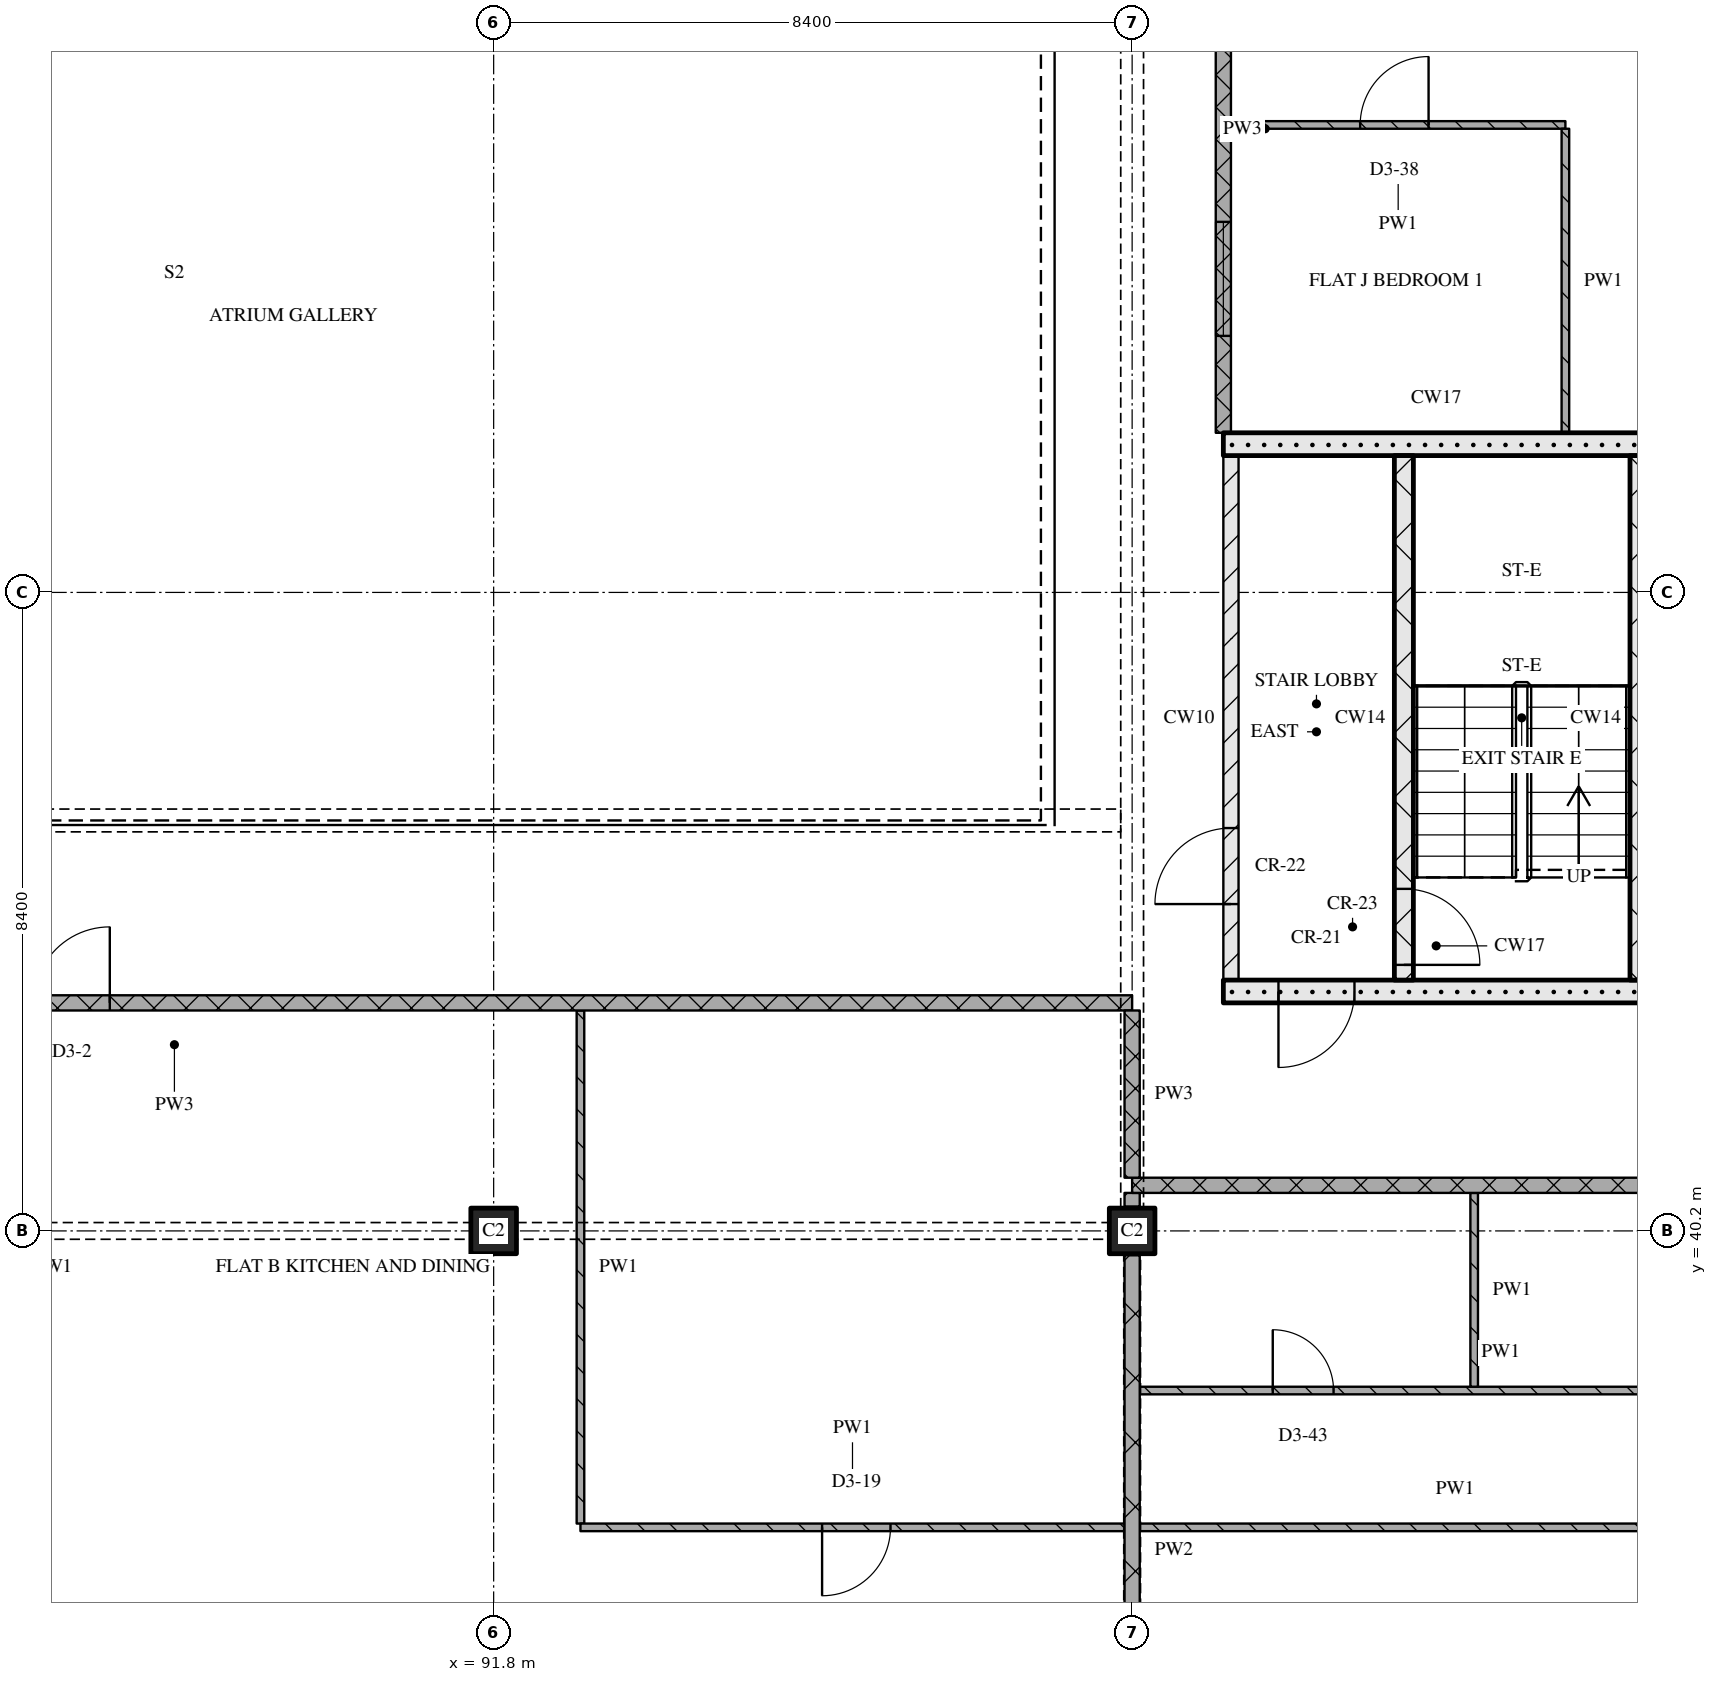
"""IFC4 building model, lengths in metres.
Left out: names, types, materials, properties, quantities, classifications, styles, units other than length and angle.
Written with IfcOpenShell. Run it as: python <this file> out.ifc"""

import sys

from ifc_helpers import new_model, si_unit, direction, frame, frame_2d, origin, origin_2d, place, context, subcontext, project, spatial, rectangle, extrude, element, fill, save


model = new_model("IFC4")
c1 = context("Model", 3, precision=1e-05, world=origin(), true_north=direction((0.0, 1.0)))
c2 = subcontext(c1, "Body", "Model", "MODEL_VIEW")
j1 = project(units=[si_unit("LENGTHUNIT", "METRE"), si_unit("PLANEANGLEUNIT", "RADIAN")], contexts=[c1])
p1 = place(None, origin())
s1 = spatial("IfcSite", under=j1, at=p1, CompositionType="ELEMENT")
p2 = place(p1, origin())
s2 = spatial("IfcBuilding", under=s1, at=p2, CompositionType="ELEMENT")
p3 = place(p2, frame((0.0, 0.0, 234.3)))
s3 = spatial("IfcBuildingStorey", under=s2, at=p3, CompositionType="ELEMENT", Elevation=234.3)
for number, where, z_axis, x_axis in (
    (1, (91.8, 40.2, 0.0), (0.0, 0.0, 1.0), (1.0, 0.0, 0.0)),
    (2, (100.2, 40.2, 0.0), (0.0, 0.0, 1.0), (1.0, 0.0, 0.0)),
):
    element("IfcColumn", number, at=place(p3, frame(where, z_axis=z_axis, x_axis=x_axis)), inside=s3, PredefinedType="COLUMN", context=c2, shape_type="SweptSolid", body=[
        extrude(rectangle(XDim=0.6, YDim=0.6, at=origin_2d()), origin(), (0.0, 0.0, 1.0), 3.6),
    ])
p4 = place(p3, frame((101.4, 43.35, 0.0), z_axis=(0.0, 0.0, 1.0), x_axis=(1.0, 0.0, 0.0)))
e3 = element("IfcWall", 3, at=p4, inside=s3, PredefinedType="SOLIDWALL", context=c2, shape_type="SweptSolid", body=[
    extrude(rectangle(XDim=5.6, YDim=0.3, at=frame_2d((2.8, 0.0))), origin(), (0.0, 0.0, 1.0), 3.32),
])
p5 = place(p4, frame((0.725, 0.0, 0.0)))
e4 = element("IfcOpeningElement", 4, at=p5, cuts=e3, PredefinedType="OPENING", context=c2, shape_type="SweptSolid", body=[
    extrude(rectangle(XDim=1.0, YDim=2.1, at=frame_2d((0.5, 1.05))), frame((0.0, 0.16, 0.0), z_axis=(0.0, -1.0, 0.0), x_axis=(1.0, 0.0, 0.0)), (0.0, 0.0, 1.0), 0.32),
])
p6 = place(p3, frame((101.5, 43.5, 0.0), z_axis=(0.0, 0.0, 1.0), x_axis=(0.0, 1.0, 0.0)))
e5 = element("IfcWall", 5, at=p6, inside=s3, PredefinedType="PARTITIONING", context=c2, shape_type="SweptSolid", body=[
    extrude(rectangle(XDim=6.9, YDim=0.2, at=frame_2d((3.45, 0.0))), origin(), (0.0, 0.0, 1.0), 3.32),
])
p7 = place(p6, frame((1.0, 0.0, 0.0)))
e6 = element("IfcOpeningElement", 6, at=p7, cuts=e5, PredefinedType="OPENING", context=c2, shape_type="SweptSolid", body=[
    extrude(rectangle(XDim=1.0, YDim=2.1, at=frame_2d((0.5, 1.05))), frame((0.0, 0.11, 0.0), z_axis=(0.0, -1.0, 0.0), x_axis=(1.0, 0.0, 0.0)), (0.0, 0.0, 1.0), 0.22),
])
p8 = place(p3, frame((103.775, 43.5, 0.0), z_axis=(0.0, 0.0, 1.0), x_axis=(0.0, 1.0, 0.0)))
e7 = element("IfcWall", 7, at=p8, inside=s3, PredefinedType="SOLIDWALL", context=c2, shape_type="SweptSolid", body=[
    extrude(rectangle(XDim=6.9, YDim=0.25, at=frame_2d((3.45, 0.0))), origin(), (0.0, 0.0, 1.0), 3.32),
])
p9 = place(p8, frame((0.2, 0.0, 0.0)))
e8 = element("IfcOpeningElement", 8, at=p9, cuts=e7, PredefinedType="OPENING", context=c2, shape_type="SweptSolid", body=[
    extrude(rectangle(XDim=1.0, YDim=2.1, at=frame_2d((0.5, 1.05))), frame((0.0, 0.135, 0.0), z_axis=(0.0, -1.0, 0.0), x_axis=(1.0, 0.0, 0.0)), (0.0, 0.0, 1.0), 0.27),
])
p10 = place(p3, frame((106.875, 43.5, 0.0), z_axis=(0.0, 0.0, 1.0), x_axis=(0.0, 1.0, 0.0)))
e9 = element("IfcWall", 9, at=p10, inside=s3, PredefinedType="SOLIDWALL", context=c2, shape_type="SweptSolid", body=[
    extrude(rectangle(XDim=6.9, YDim=0.25, at=frame_2d((3.45, 0.0))), origin(), (0.0, 0.0, 1.0), 3.32),
])
p11 = place(p3, frame((101.4, 50.55, 0.0), z_axis=(0.0, 0.0, 1.0), x_axis=(1.0, 0.0, 0.0)))
e10 = element("IfcWall", 10, at=p11, inside=s3, PredefinedType="SOLIDWALL", context=c2, shape_type="SweptSolid", body=[
    extrude(rectangle(XDim=5.6, YDim=0.3, at=frame_2d((2.8, 0.0))), origin(), (0.0, 0.0, 1.0), 3.32),
])
p12 = place(p3, frame((100.3, 38.1, 0.0), z_axis=(0.0, 0.0, 1.0), x_axis=(1.0, 0.0, 0.0)))
e11 = element("IfcWall", 11, at=p12, inside=s3, PredefinedType="PARTITIONING", context=c2, shape_type="SweptSolid", body=[
    extrude(rectangle(XDim=9.5, YDim=0.1, at=frame_2d((4.75, 0.0))), origin(), (0.0, 0.0, 1.0), 3.32),
])
p13 = place(p12, frame((1.75, 0.0, 0.0)))
e12 = element("IfcOpeningElement", 12, at=p13, cuts=e11, PredefinedType="OPENING", context=c2, shape_type="SweptSolid", body=[
    extrude(rectangle(XDim=0.8, YDim=2.1, at=frame_2d((0.4, 1.05))), frame((0.0, 0.06, 0.0), z_axis=(0.0, -1.0, 0.0), x_axis=(1.0, 0.0, 0.0)), (0.0, 0.0, 1.0), 0.12),
])
p14 = place(p3, frame((124.58, 40.8, 0.0), z_axis=(0.0, 0.0, 1.0), x_axis=(-1.0, 0.0, 0.0)))
e13 = element("IfcWall", 13, at=p14, inside=s3, PredefinedType="PARTITIONING", context=c2, shape_type="SweptSolid", body=[
    extrude(rectangle(XDim=24.38, YDim=0.2, at=frame_2d((12.19, 0.0))), origin(), (0.0, 0.0, 1.0), 3.32),
])
p15 = place(p14, frame((13.53, 0.0, 0.0)))
e14 = element("IfcOpeningElement", 14, at=p15, cuts=e13, PredefinedType="OPENING", context=c2, shape_type="SweptSolid", body=[
    extrude(rectangle(XDim=1.0, YDim=2.1, at=frame_2d((0.5, 1.05))), frame((0.0, 0.11, 0.0), z_axis=(0.0, -1.0, 0.0), x_axis=(1.0, 0.0, 0.0)), (0.0, 0.0, 1.0), 0.22),
])
p16 = place(p3, frame((100.2, 43.2, 0.0), z_axis=(0.0, 0.0, 1.0), x_axis=(-1.0, 0.0, 0.0)))
e15 = element("IfcWall", 15, at=p16, inside=s3, PredefinedType="PARTITIONING", context=c2, shape_type="SweptSolid", body=[
    extrude(rectangle(XDim=25.2, YDim=0.2, at=frame_2d((12.6, 0.0))), origin(), (0.0, 0.0, 1.0), 3.32),
])
p17 = place(p16, frame((13.45, 0.0, 0.0)))
e16 = element("IfcOpeningElement", 16, at=p17, cuts=e15, PredefinedType="OPENING", context=c2, shape_type="SweptSolid", body=[
    extrude(rectangle(XDim=1.0, YDim=2.1, at=frame_2d((0.5, 1.05))), frame((0.0, 0.11, 0.0), z_axis=(0.0, -1.0, 0.0), x_axis=(1.0, 0.0, 0.0)), (0.0, 0.0, 1.0), 0.22),
])
p18 = place(p3, frame((105.9, 54.75, 0.0), z_axis=(0.0, 0.0, 1.0), x_axis=(-1.0, 0.0, 0.0)))
e17 = element("IfcWall", 17, at=p18, inside=s3, PredefinedType="PARTITIONING", context=c2, shape_type="SweptSolid", body=[
    extrude(rectangle(XDim=4.4, YDim=0.1, at=frame_2d((2.2, 0.0))), origin(), (0.0, 0.0, 1.0), 3.32),
])
p19 = place(p18, frame((1.8, 0.0, 0.0)))
e18 = element("IfcOpeningElement", 18, at=p19, cuts=e17, PredefinedType="OPENING", context=c2, shape_type="SweptSolid", body=[
    extrude(rectangle(XDim=0.9, YDim=2.1, at=frame_2d((0.45, 1.05))), frame((0.0, 0.06, 0.0), z_axis=(0.0, -1.0, 0.0), x_axis=(1.0, 0.0, 0.0)), (0.0, 0.0, 1.0), 0.12),
])
p20 = place(p3, frame((92.942, 43.1, 0.0), z_axis=(0.0, 0.0, 1.0), x_axis=(0.0, -1.0, 0.0)))
e19 = element("IfcWall", 19, at=p20, inside=s3, PredefinedType="PARTITIONING", context=c2, shape_type="SweptSolid", body=[
    extrude(rectangle(XDim=6.75, YDim=0.1, at=frame_2d((3.375, 0.0))), origin(), (0.0, 0.0, 1.0), 3.32),
])
p21 = place(p3, frame((100.2, 43.1, 0.0), z_axis=(0.0, 0.0, 1.0), x_axis=(0.0, -1.0, 0.0)))
e20 = element("IfcWall", 20, at=p21, inside=s3, PredefinedType="PARTITIONING", context=c2, shape_type="SweptSolid", body=[
    extrude(rectangle(XDim=2.2, YDim=0.2, at=frame_2d((1.1, 0.0))), origin(), (0.0, 0.0, 1.0), 2.53),
])
p22 = place(p3, frame((100.2, 39.88, 0.0), z_axis=(0.0, 0.0, 1.0), x_axis=(0.0, -1.0, 0.0)))
e21 = element("IfcWall", 21, at=p22, inside=s3, PredefinedType="PARTITIONING", context=c2, shape_type="SweptSolid", body=[
    extrude(rectangle(XDim=7.76, YDim=0.2, at=frame_2d((3.88, 0.0))), origin(), (0.0, 0.0, 1.0), 2.72),
])
p23 = place(p3, frame((100.2, 40.7, 0.0), z_axis=(0.0, 0.0, 1.0), x_axis=(0.0, -1.0, 0.0)))
e22 = element("IfcWall", 22, at=p23, inside=s3, PredefinedType="PARTITIONING", context=c2, shape_type="SweptSolid", body=[
    extrude(rectangle(XDim=0.18, YDim=0.2, at=frame_2d((0.09, 0.0))), origin(), (0.0, 0.0, 1.0), 3.32),
])
p24 = place(p3, frame((101.4, 58.7, 0.0), z_axis=(0.0, 0.0, 1.0), x_axis=(0.0, -1.0, 0.0)))
e23 = element("IfcWall", 23, at=p24, inside=s3, PredefinedType="PARTITIONING", context=c2, shape_type="SweptSolid", body=[
    extrude(rectangle(XDim=8.0, YDim=0.2, at=frame_2d((4.0, 0.0))), origin(), (0.0, 0.0, 1.0), 3.32),
])
p25 = place(p24, frame((5.225, 0.0, 0.9)))
e24 = element("IfcOpeningElement", 24, at=p25, cuts=e23, PredefinedType="OPENING", context=c2, shape_type="SweptSolid", body=[
    extrude(rectangle(XDim=1.5, YDim=1.5, at=frame_2d((0.75, 0.75))), frame((0.0, 0.11, 0.0), z_axis=(0.0, -1.0, 0.0), x_axis=(1.0, 0.0, 0.0)), (0.0, 0.0, 1.0), 0.22),
])
p26 = place(p3, frame((104.7, 40.7, 0.0), z_axis=(0.0, 0.0, 1.0), x_axis=(0.0, -1.0, 0.0)))
e25 = element("IfcWall", 25, at=p26, inside=s3, PredefinedType="PARTITIONING", context=c2, shape_type="SweptSolid", body=[
    extrude(rectangle(XDim=2.55, YDim=0.1, at=frame_2d((1.275, 0.0))), origin(), (0.0, 0.0, 1.0), 3.32),
])
p27 = place(p3, frame((105.9, 54.7, 0.0), z_axis=(0.0, 0.0, 1.0), x_axis=(0.0, -1.0, 0.0)))
e26 = element("IfcWall", 26, at=p27, inside=s3, PredefinedType="PARTITIONING", context=c2, shape_type="SweptSolid", body=[
    extrude(rectangle(XDim=4.0, YDim=0.1, at=frame_2d((2.0, 0.0))), origin(), (0.0, 0.0, 1.0), 3.32),
])
p28 = place(p3, frame((92.942, 36.3, 0.0), z_axis=(0.0, 0.0, 1.0), x_axis=(1.0, 0.0, 0.0)))
e27 = element("IfcWall", 27, at=p28, inside=s3, PredefinedType="PARTITIONING", context=c2, shape_type="SweptSolid", body=[
    extrude(rectangle(XDim=7.158, YDim=0.1, at=frame_2d((3.579, 0.0))), origin(), (0.0, 0.0, 1.0), 3.32),
])
p29 = place(p28, frame((3.179, 0.0, 0.0)))
e28 = element("IfcOpeningElement", 28, at=p29, cuts=e27, PredefinedType="OPENING", context=c2, shape_type="SweptSolid", body=[
    extrude(rectangle(XDim=0.9, YDim=2.1, at=frame_2d((0.45, 1.05))), frame((0.0, 0.06, 0.0), z_axis=(0.0, -1.0, 0.0), x_axis=(1.0, 0.0, 0.0)), (0.0, 0.0, 1.0), 0.12),
])
p30 = place(p3, frame((100.3, 36.3, 0.0), z_axis=(0.0, 0.0, 1.0), x_axis=(1.0, 0.0, 0.0)))
e29 = element("IfcWall", 29, at=p30, inside=s3, PredefinedType="PARTITIONING", context=c2, shape_type="SweptSolid", body=[
    extrude(rectangle(XDim=8.3, YDim=0.1, at=frame_2d((4.15, 0.0))), origin(), (0.0, 0.0, 1.0), 3.32),
])
p31 = place(p5, origin())
e30 = element("IfcDoor", 30, at=p31, inside=s3, OperationType="SINGLE_SWING_RIGHT", PredefinedType="DOOR", context=c2, shape_type="SweptSolid", body=[
    extrude(rectangle(XDim=1.0, YDim=2.1, at=frame_2d((0.5, 1.05))), frame((0.0, 0.025, 0.0), z_axis=(0.0, -1.0, 0.0), x_axis=(1.0, 0.0, 0.0)), (0.0, 0.0, 1.0), 0.05),
])
fill(e4, e30)
p32 = place(p9, origin())
e31 = element("IfcDoor", 31, at=p32, inside=s3, OperationType="SINGLE_SWING_RIGHT", PredefinedType="DOOR", context=c2, shape_type="SweptSolid", body=[
    extrude(rectangle(XDim=1.0, YDim=2.1, at=frame_2d((0.5, 1.05))), frame((0.0, 0.025, 0.0), z_axis=(0.0, -1.0, 0.0), x_axis=(1.0, 0.0, 0.0)), (0.0, 0.0, 1.0), 0.05),
])
fill(e8, e31)
p33 = place(p7, origin())
e32 = element("IfcDoor", 32, at=p33, inside=s3, OperationType="SINGLE_SWING_LEFT", PredefinedType="DOOR", context=c2, shape_type="SweptSolid", body=[
    extrude(rectangle(XDim=1.0, YDim=2.1, at=frame_2d((0.5, 1.05))), frame((0.0, 0.025, 0.0), z_axis=(0.0, -1.0, 0.0), x_axis=(1.0, 0.0, 0.0)), (0.0, 0.0, 1.0), 0.05),
])
fill(e6, e32)
p34 = place(p13, origin())
e33 = element("IfcDoor", 33, at=p34, inside=s3, OperationType="SINGLE_SWING_LEFT", PredefinedType="DOOR", context=c2, shape_type="SweptSolid", body=[
    extrude(rectangle(XDim=0.8, YDim=2.1, at=frame_2d((0.4, 1.05))), frame((0.0, 0.025, 0.0), z_axis=(0.0, -1.0, 0.0), x_axis=(1.0, 0.0, 0.0)), (0.0, 0.0, 1.0), 0.05),
])
fill(e12, e33)
p35 = place(p17, origin())
e34 = element("IfcDoor", 34, at=p35, inside=s3, OperationType="SINGLE_SWING_RIGHT", PredefinedType="DOOR", context=c2, shape_type="SweptSolid", body=[
    extrude(rectangle(XDim=1.0, YDim=2.1, at=frame_2d((0.5, 1.05))), frame((0.0, 0.025, 0.0), z_axis=(0.0, -1.0, 0.0), x_axis=(1.0, 0.0, 0.0)), (0.0, 0.0, 1.0), 0.05),
])
fill(e16, e34)
p36 = place(p19, origin())
e35 = element("IfcDoor", 35, at=p36, inside=s3, OperationType="SINGLE_SWING_RIGHT", PredefinedType="DOOR", context=c2, shape_type="SweptSolid", body=[
    extrude(rectangle(XDim=0.9, YDim=2.1, at=frame_2d((0.45, 1.05))), frame((0.0, 0.025, 0.0), z_axis=(0.0, -1.0, 0.0), x_axis=(1.0, 0.0, 0.0)), (0.0, 0.0, 1.0), 0.05),
])
fill(e18, e35)
p37 = place(p29, origin())
e36 = element("IfcDoor", 36, at=p37, inside=s3, OperationType="SINGLE_SWING_RIGHT", PredefinedType="DOOR", context=c2, shape_type="SweptSolid", body=[
    extrude(rectangle(XDim=0.9, YDim=2.1, at=frame_2d((0.45, 1.05))), frame((0.0, 0.025, 0.0), z_axis=(0.0, -1.0, 0.0), x_axis=(1.0, 0.0, 0.0)), (0.0, 0.0, 1.0), 0.05),
])
fill(e28, e36)
p38 = place(p25, origin())
e37 = element("IfcWindow", 37, at=p38, inside=s3, PartitioningType="SINGLE_PANEL", PredefinedType="WINDOW", context=c2, shape_type="SweptSolid", body=[
    extrude(rectangle(XDim=1.5, YDim=1.5, at=frame_2d((0.75, 0.75))), frame((0.0, 0.03, 0.0), z_axis=(0.0, -1.0, 0.0), x_axis=(1.0, 0.0, 0.0)), (0.0, 0.0, 1.0), 0.06),
])
fill(e24, e37)
save(model, sys.argv[1])
